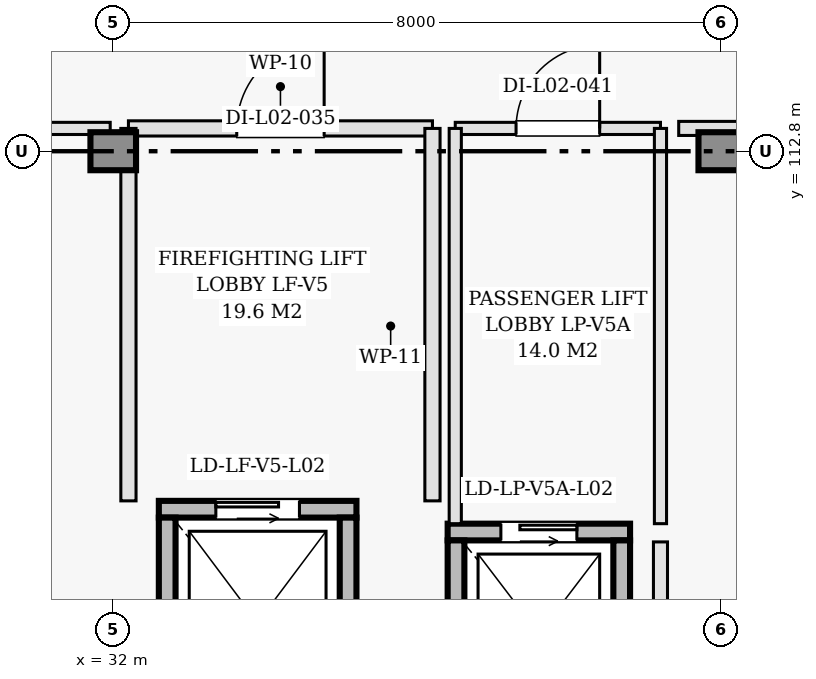
"""IFC4 building model, lengths in metres.
Left out: names, types, materials, properties, quantities, classifications, styles, units other than length and angle.
Written with IfcOpenShell. Run it as: python <this file> out.ifc"""

import sys

from ifc_helpers import new_model, si_unit, direction, frame, frame_2d, origin, origin_2d, place, context, subcontext, project, spatial, rectangle, extrude, element, fill, save


model = new_model("IFC4")
c1 = context("Model", 3, precision=1e-05, world=origin(), true_north=direction((0.0, 1.0)))
c2 = subcontext(c1, "Body", "Model", "MODEL_VIEW")
j1 = project(units=[si_unit("LENGTHUNIT", "METRE"), si_unit("PLANEANGLEUNIT", "RADIAN")], contexts=[c1])
p1 = place(None, origin())
s1 = spatial("IfcSite", under=j1, at=p1, CompositionType="ELEMENT")
p2 = place(p1, origin())
s2 = spatial("IfcBuilding", under=s1, at=p2, CompositionType="ELEMENT")
p3 = place(p2, frame((0.0, 0.0, 9.6)))
s3 = spatial("IfcBuildingStorey", under=s2, at=p3, CompositionType="ELEMENT", Elevation=9.6)
for number, where, z_axis, x_axis in (
    (1, (32.0, 112.8, 0.0), (0.0, 0.0, 1.0), (1.0, 0.0, 0.0)),
    (2, (40.0, 112.8, 0.0), (0.0, 0.0, 1.0), (1.0, 0.0, 0.0)),
):
    element("IfcColumn", number, at=place(p3, frame(where, z_axis=z_axis, x_axis=x_axis)), inside=s3, PredefinedType="COLUMN", context=c2, shape_type="SweptSolid", body=[
        extrude(rectangle(XDim=0.5, YDim=0.5, at=origin_2d()), origin(), (0.0, 0.0, 1.0), 4.2),
    ])
p4 = place(p3, frame((32.6, 108.09, 0.0), z_axis=(0.0, 0.0, 1.0), x_axis=(1.0, 0.0, 0.0)))
e3 = element("IfcWall", 3, at=p4, inside=s3, PredefinedType="SHEAR", context=c2, shape_type="SweptSolid", body=[
    extrude(rectangle(XDim=2.6, YDim=0.22, at=frame_2d((1.3, 0.0))), origin(), (0.0, 0.0, 1.0), 3.94),
])
p5 = place(p4, frame((0.75, 0.0, 0.0)))
e4 = element("IfcOpeningElement", 4, at=p5, cuts=e3, PredefinedType="OPENING", context=c2, shape_type="SweptSolid", body=[
    extrude(rectangle(XDim=1.1, YDim=2.15, at=frame_2d((0.55, 1.075))), frame((0.0, 0.12, 0.0), z_axis=(0.0, -1.0, 0.0), x_axis=(1.0, 0.0, 0.0)), (0.0, 0.0, 1.0), 0.24),
])
for number, where, z_axis, x_axis in (
    (5, (32.71, 105.22, 0.0), (0.0, 0.0, 1.0), (0.0, 1.0, 0.0)),
    (6, (35.09, 105.22, 0.0), (0.0, 0.0, 1.0), (0.0, 1.0, 0.0)),
):
    element("IfcWall", number, at=place(p3, frame(where, z_axis=z_axis, x_axis=x_axis)), inside=s3, PredefinedType="SHEAR", context=c2, shape_type="SweptSolid", body=[
        extrude(rectangle(XDim=2.76, YDim=0.22, at=frame_2d((1.38, 0.0))), origin(), (0.0, 0.0, 1.0), 3.94),
    ])
p6 = place(p3, frame((32.2, 113.1, 0.0), z_axis=(0.0, 0.0, 1.0), x_axis=(1.0, 0.0, 0.0)))
e7 = element("IfcWall", 7, at=p6, inside=s3, PredefinedType="PARTITIONING", context=c2, shape_type="SweptSolid", body=[
    extrude(rectangle(XDim=4.0, YDim=0.2, at=frame_2d((2.0, 0.0))), origin(), (0.0, 0.0, 1.0), 3.175),
])
p7 = place(p6, frame((1.425, 0.0, 0.0)))
e8 = element("IfcOpeningElement", 8, at=p7, cuts=e7, PredefinedType="OPENING", context=c2, shape_type="SweptSolid", body=[
    extrude(rectangle(XDim=1.15, YDim=2.15, at=frame_2d((0.575, 1.075))), frame((0.0, 0.11, 0.0), z_axis=(0.0, -1.0, 0.0), x_axis=(1.0, 0.0, 0.0)), (0.0, 0.0, 1.0), 0.22),
])
for number, where, z_axis, x_axis in (
    (9, (32.2, 108.2, 0.0), (0.0, 0.0, 1.0), (0.0, 1.0, 0.0)),
    (10, (36.2, 108.2, 0.0), (0.0, 0.0, 1.0), (0.0, 1.0, 0.0)),
):
    element("IfcWall", number, at=place(p3, frame(where, z_axis=z_axis, x_axis=x_axis)), inside=s3, PredefinedType="PARTITIONING", context=c2, shape_type="SweptSolid", body=[
        extrude(rectangle(XDim=4.9, YDim=0.2, at=frame_2d((2.45, 0.0))), origin(), (0.0, 0.0, 1.0), 3.175),
    ])
p8 = place(p3, frame((36.4, 107.79, 0.0), z_axis=(0.0, 0.0, 1.0), x_axis=(1.0, 0.0, 0.0)))
e11 = element("IfcWall", 11, at=p8, inside=s3, PredefinedType="SHEAR", context=c2, shape_type="SweptSolid", body=[
    extrude(rectangle(XDim=2.4, YDim=0.22, at=frame_2d((1.2, 0.0))), origin(), (0.0, 0.0, 1.0), 3.94),
])
p9 = place(p8, frame((0.7, 0.0, 0.0)))
e12 = element("IfcOpeningElement", 12, at=p9, cuts=e11, PredefinedType="OPENING", context=c2, shape_type="SweptSolid", body=[
    extrude(rectangle(XDim=1.0, YDim=2.15, at=frame_2d((0.5, 1.075))), frame((0.0, 0.12, 0.0), z_axis=(0.0, -1.0, 0.0), x_axis=(1.0, 0.0, 0.0)), (0.0, 0.0, 1.0), 0.24),
])
for number, where, z_axis, x_axis in (
    (13, (36.51, 105.22, 0.0), (0.0, 0.0, 1.0), (0.0, 1.0, 0.0)),
    (14, (38.69, 105.22, 0.0), (0.0, 0.0, 1.0), (0.0, 1.0, 0.0)),
):
    element("IfcWall", number, at=place(p3, frame(where, z_axis=z_axis, x_axis=x_axis)), inside=s3, PredefinedType="SHEAR", context=c2, shape_type="SweptSolid", body=[
        extrude(rectangle(XDim=2.46, YDim=0.22, at=frame_2d((1.23, 0.0))), origin(), (0.0, 0.0, 1.0), 3.94),
    ])
p10 = place(p3, frame((36.5, 113.1, 0.0), z_axis=(0.0, 0.0, 1.0), x_axis=(1.0, 0.0, 0.0)))
e15 = element("IfcWall", 15, at=p10, inside=s3, PredefinedType="PARTITIONING", context=c2, shape_type="SweptSolid", body=[
    extrude(rectangle(XDim=2.7, YDim=0.16, at=frame_2d((1.35, 0.0))), origin(), (0.0, 0.0, 1.0), 3.175),
])
p11 = place(p10, frame((0.8, 0.0, 0.0)))
e16 = element("IfcOpeningElement", 16, at=p11, cuts=e15, PredefinedType="OPENING", context=c2, shape_type="SweptSolid", body=[
    extrude(rectangle(XDim=1.1, YDim=2.15, at=frame_2d((0.55, 1.075))), frame((0.0, 0.09, 0.0), z_axis=(0.0, -1.0, 0.0), x_axis=(1.0, 0.0, 0.0)), (0.0, 0.0, 1.0), 0.18),
])
for number, where, z_axis, x_axis in (
    (17, (36.5, 107.9, 0.0), (0.0, 0.0, 1.0), (0.0, 1.0, 0.0)),
    (18, (39.2, 107.9, 0.0), (0.0, 0.0, 1.0), (0.0, 1.0, 0.0)),
):
    element("IfcWall", number, at=place(p3, frame(where, z_axis=z_axis, x_axis=x_axis)), inside=s3, PredefinedType="PARTITIONING", context=c2, shape_type="SweptSolid", body=[
        extrude(rectangle(XDim=5.2, YDim=0.16, at=frame_2d((2.6, 0.0))), origin(), (0.0, 0.0, 1.0), 3.175),
    ])
p12 = place(p3, frame((39.44, 113.1, 0.0), z_axis=(0.0, 0.0, 1.0), x_axis=(1.0, 0.0, 0.0)))
e19 = element("IfcWall", 19, at=p12, inside=s3, PredefinedType="PARTITIONING", context=c2, shape_type="SweptSolid", body=[
    extrude(rectangle(XDim=38.014, YDim=0.185, at=frame_2d((19.007, 0.0))), origin(), (0.0, 0.0, 1.0), 3.025),
])
p13 = place(p3, frame((39.2, 95.105, 0.0), z_axis=(0.0, 0.0, 1.0), x_axis=(0.0, 1.0, 0.0)))
e20 = element("IfcWall", 20, at=p13, inside=s3, PredefinedType="PARTITIONING", context=c2, shape_type="SweptSolid", body=[
    extrude(rectangle(XDim=12.555, YDim=0.185, at=frame_2d((6.277, 0.0))), origin(), (0.0, 0.0, 1.0), 3.175),
])
p14 = place(p3, frame((29.087, 113.1, 0.0), z_axis=(0.0, 0.0, 1.0), x_axis=(1.0, 0.0, 0.0)))
e21 = element("IfcWall", 21, at=p14, inside=s3, PredefinedType="PARTITIONING", context=c2, shape_type="SweptSolid", body=[
    extrude(rectangle(XDim=2.873, YDim=0.16, at=frame_2d((1.437, 0.0))), origin(), (0.0, 0.0, 1.0), 3.275),
])
p15 = place(p5, origin())
e22 = element("IfcDoor", 22, at=p15, inside=s3, OperationType="SLIDING_TO_LEFT", PredefinedType="DOOR", context=c2, shape_type="SweptSolid", body=[
    extrude(rectangle(XDim=1.1, YDim=2.15, at=frame_2d((0.55, 1.075))), frame((0.0, 0.025, 0.0), z_axis=(0.0, -1.0, 0.0), x_axis=(1.0, 0.0, 0.0)), (0.0, 0.0, 1.0), 0.05),
])
fill(e4, e22)
p16 = place(p7, origin())
e23 = element("IfcDoor", 23, at=p16, inside=s3, OperationType="SINGLE_SWING_RIGHT", PredefinedType="DOOR", context=c2, shape_type="SweptSolid", body=[
    extrude(rectangle(XDim=1.15, YDim=2.15, at=frame_2d((0.575, 1.075))), frame((0.0, 0.025, 0.0), z_axis=(0.0, -1.0, 0.0), x_axis=(1.0, 0.0, 0.0)), (0.0, 0.0, 1.0), 0.05),
])
fill(e8, e23)
p17 = place(p9, origin())
e24 = element("IfcDoor", 24, at=p17, inside=s3, OperationType="SLIDING_TO_RIGHT", PredefinedType="DOOR", context=c2, shape_type="SweptSolid", body=[
    extrude(rectangle(XDim=1.0, YDim=2.15, at=frame_2d((0.5, 1.075))), frame((0.0, 0.025, 0.0), z_axis=(0.0, -1.0, 0.0), x_axis=(1.0, 0.0, 0.0)), (0.0, 0.0, 1.0), 0.05),
])
fill(e12, e24)
p18 = place(p11, origin())
e25 = element("IfcDoor", 25, at=p18, inside=s3, OperationType="SINGLE_SWING_RIGHT", PredefinedType="DOOR", context=c2, shape_type="SweptSolid", body=[
    extrude(rectangle(XDim=1.1, YDim=2.15, at=frame_2d((0.55, 1.075))), frame((0.0, 0.025, 0.0), z_axis=(0.0, -1.0, 0.0), x_axis=(1.0, 0.0, 0.0)), (0.0, 0.0, 1.0), 0.05),
])
fill(e16, e25)
save(model, sys.argv[1])
